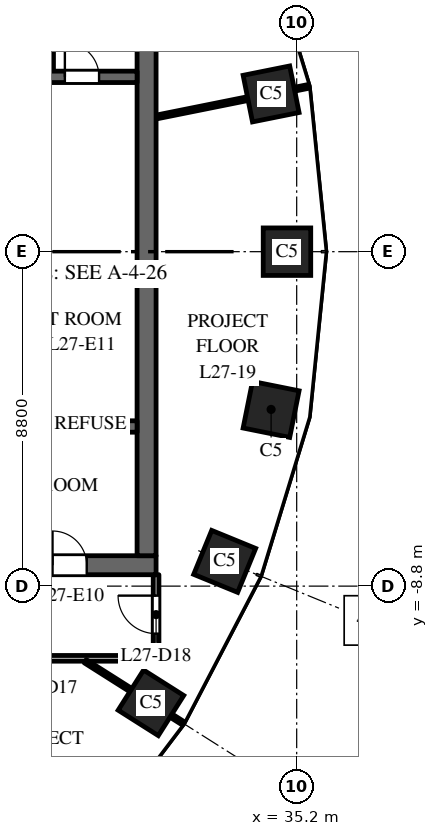
"""IFC4 building model, lengths in metres.
Left out: names, types, materials, properties, quantities, classifications, styles, units other than length and angle.
Written with IfcOpenShell. Run it as: python <this file> out.ifc"""

import sys

from ifc_helpers import new_model, si_unit, direction, frame, frame_2d, origin, origin_2d, place, context, subcontext, project, spatial, rectangle, extrude, element, fill, save


model = new_model("IFC4")
c1 = context("Model", 3, precision=1e-05, world=origin(), true_north=direction((0.0, 1.0)))
c2 = subcontext(c1, "Body", "Model", "MODEL_VIEW")
j1 = project(units=[si_unit("LENGTHUNIT", "METRE"), si_unit("PLANEANGLEUNIT", "RADIAN")], contexts=[c1])
p1 = place(None, origin())
s1 = spatial("IfcSite", under=j1, at=p1, CompositionType="ELEMENT")
p2 = place(p1, origin())
s2 = spatial("IfcBuilding", under=s1, at=p2, CompositionType="ELEMENT")
p3 = place(p2, frame((0.0, 0.0, 120.0)))
s3 = spatial("IfcBuildingStorey", under=s2, at=p3, CompositionType="ELEMENT", Elevation=120.0)
for number, where, z_axis, x_axis in (
    (1, (34.945, 0.0, 0.0), (0.0, 0.0, 1.0), (0.0, 1.0, 0.0)),
    (2, (34.527, 4.151, 0.0), (0.0, 0.0, 1.0), (-0.197, 0.98, 0.0)),
    (3, (31.365, -11.871, 0.0), (0.0, 0.0, 1.0), (0.535, 0.845, 0.0)),
    (4, (33.305, -8.149, 0.0), (0.0, 0.0, 1.0), (0.379, 0.925, 0.0)),
    (5, (34.527, -4.151, 0.0), (0.0, 0.0, 1.0), (0.197, 0.98, 0.0)),
):
    element("IfcColumn", number, at=place(p3, frame(where, z_axis=z_axis, x_axis=x_axis)), inside=s3, PredefinedType="COLUMN", context=c2, shape_type="SweptSolid", body=[
        extrude(rectangle(XDim=1.25, YDim=1.25, at=origin_2d()), origin(), (0.0, 0.0, 1.0), 4.0),
    ])
p4 = place(p3, frame((16.5, -8.25, 0.0), z_axis=(0.0, 0.0, 1.0), x_axis=(1.0, 0.0, 0.0)))
e6 = element("IfcWall", 6, at=p4, inside=s3, PredefinedType="SHEAR", context=c2, shape_type="SweptSolid", body=[
    extrude(rectangle(XDim=15.0, YDim=0.5, at=frame_2d((7.5, 0.0))), origin(), (0.0, 0.0, 1.0), 3.7),
])
p5 = place(p4, frame((6.9, 0.0, 0.0)))
e7 = element("IfcOpeningElement", 7, at=p5, cuts=e6, PredefinedType="OPENING", context=c2, shape_type="SweptSolid", body=[
    extrude(rectangle(XDim=1.2, YDim=2.1, at=frame_2d((0.6, 1.05))), frame((0.0, 0.26, 0.0), z_axis=(0.0, -1.0, 0.0), x_axis=(1.0, 0.0, 0.0)), (0.0, 0.0, 1.0), 0.52),
])
p6 = place(p4, frame((12.275, 0.0, 0.0)))
e8 = element("IfcOpeningElement", 8, at=p6, cuts=e6, PredefinedType="OPENING", context=c2, shape_type="SweptSolid", body=[
    extrude(rectangle(XDim=0.9, YDim=2.1, at=frame_2d((0.45, 1.05))), frame((0.0, 0.26, 0.0), z_axis=(0.0, -1.0, 0.0), x_axis=(1.0, 0.0, 0.0)), (0.0, 0.0, 1.0), 0.52),
])
p7 = place(p3, frame((31.25, -8.0, 0.0), z_axis=(0.0, 0.0, 1.0), x_axis=(0.0, 1.0, 0.0)))
e9 = element("IfcWall", 9, at=p7, inside=s3, PredefinedType="SHEAR", context=c2, shape_type="SweptSolid", body=[
    extrude(rectangle(XDim=16.0, YDim=0.5, at=frame_2d((8.0, 0.0))), origin(), (0.0, 0.0, 1.0), 3.7),
])
p8 = place(p3, frame((24.9, 4.6, 0.0), z_axis=(0.0, 0.0, 1.0), x_axis=(1.0, 0.0, 0.0)))
e10 = element("IfcWall", 10, at=p8, inside=s3, PredefinedType="SHEAR", context=c2, shape_type="SweptSolid", body=[
    extrude(rectangle(XDim=6.1, YDim=0.3, at=frame_2d((3.05, 0.0))), origin(), (0.0, 0.0, 1.0), 3.7),
])
p9 = place(p8, frame((4.2, 0.0, 0.0)))
e11 = element("IfcOpeningElement", 11, at=p9, cuts=e10, PredefinedType="OPENING", context=c2, shape_type="SweptSolid", body=[
    extrude(rectangle(XDim=0.9, YDim=2.1, at=frame_2d((0.45, 1.05))), frame((0.0, 0.16, 0.0), z_axis=(0.0, -1.0, 0.0), x_axis=(1.0, 0.0, 0.0)), (0.0, 0.0, 1.0), 0.32),
])
p10 = place(p3, frame((28.7, 4.75, 0.0), z_axis=(0.0, 0.0, 1.0), x_axis=(0.0, 1.0, 0.0)))
e12 = element("IfcWall", 12, at=p10, inside=s3, PredefinedType="PARTITIONING", context=c2, shape_type="SweptSolid", body=[
    extrude(rectangle(XDim=3.25, YDim=0.2, at=frame_2d((1.625, 0.0))), origin(), (0.0, 0.0, 1.0), 3.7),
])
p11 = place(p3, frame((24.9, -4.6, 0.0), z_axis=(0.0, 0.0, 1.0), x_axis=(1.0, 0.0, 0.0)))
e13 = element("IfcWall", 13, at=p11, inside=s3, PredefinedType="SHEAR", context=c2, shape_type="SweptSolid", body=[
    extrude(rectangle(XDim=6.1, YDim=0.3, at=frame_2d((3.05, 0.0))), origin(), (0.0, 0.0, 1.0), 3.7),
])
p12 = place(p3, frame((20.603, -10.7, 0.0), z_axis=(0.0, 0.0, 1.0), x_axis=(1.0, 0.0, 0.0)))
e14 = element("IfcWall", 14, at=p12, inside=s3, PredefinedType="PARTITIONING", context=c2, shape_type="SweptSolid", body=[
    extrude(rectangle(XDim=10.897, YDim=0.15, at=frame_2d((5.448, 0.0))), origin(), (0.0, 0.0, 1.0), 2.9),
])
p13 = place(p12, frame((3.792, 0.0, 0.0)))
e15 = element("IfcOpeningElement", 15, at=p13, cuts=e14, PredefinedType="OPENING", context=c2, shape_type="SweptSolid", body=[
    extrude(rectangle(XDim=1.0, YDim=2.1, at=frame_2d((0.5, 1.05))), frame((0.0, 0.085, 0.0), z_axis=(0.0, -1.0, 0.0), x_axis=(1.0, 0.0, 0.0)), (0.0, 0.0, 1.0), 0.17),
])
p14 = place(p12, frame((6.622, 0.0, 0.0)))
e16 = element("IfcOpeningElement", 16, at=p14, cuts=e14, PredefinedType="OPENING", context=c2, shape_type="SweptSolid", body=[
    extrude(rectangle(XDim=1.0, YDim=2.1, at=frame_2d((0.5, 1.05))), frame((0.0, 0.085, 0.0), z_axis=(0.0, -1.0, 0.0), x_axis=(1.0, 0.0, 0.0)), (0.0, 0.0, 1.0), 0.17),
])
p15 = place(p3, frame((29.637, -10.777, 0.0), z_axis=(0.0, 0.0, 1.0), x_axis=(0.844810627195, -0.535065420467, 0.0)))
e17 = element("IfcWall", 17, at=p15, inside=s3, PredefinedType="PARTITIONING", context=c2, shape_type="SweptSolid", body=[
    extrude(rectangle(XDim=3.048, YDim=0.1, at=frame_2d((1.524, 0.0))), origin(), (0.0, 0.0, 1.0), 2.9),
])
p16 = place(p3, frame((31.5, -10.7, 0.0), z_axis=(0.0, 0.0, 1.0), x_axis=(0.0, 1.0, 0.0)))
e18 = element("IfcWall", 18, at=p16, inside=s3, PredefinedType="PARTITIONING", context=c2, shape_type="SweptSolid", body=[
    extrude(rectangle(XDim=2.2, YDim=0.15, at=frame_2d((1.1, 0.0))), origin(), (0.0, 0.0, 1.0), 2.9),
])
p17 = place(p16, frame((0.65, 0.0, 0.0)))
e19 = element("IfcOpeningElement", 19, at=p17, cuts=e18, PredefinedType="OPENING", context=c2, shape_type="SweptSolid", body=[
    extrude(rectangle(XDim=1.0, YDim=2.1, at=frame_2d((0.5, 1.05))), frame((0.0, 0.085, 0.0), z_axis=(0.0, -1.0, 0.0), x_axis=(1.0, 0.0, 0.0)), (0.0, 0.0, 1.0), 0.17),
])
p18 = place(p3, frame((31.5, 3.542, 0.0), z_axis=(0.0, 0.0, 1.0), x_axis=(0.980357474535, 0.197228857227, 0.0)))
e20 = element("IfcWall", 20, at=p18, inside=s3, PredefinedType="PARTITIONING", context=c2, shape_type="SweptSolid", body=[
    extrude(rectangle(XDim=4.092, YDim=0.1, at=frame_2d((2.046, 0.0))), origin(), (0.0, 0.0, 1.0), 2.9),
])
p19 = place(p6, origin())
e21 = element("IfcDoor", 21, at=p19, inside=s3, OperationType="SINGLE_SWING_RIGHT", PredefinedType="DOOR", context=c2, shape_type="SweptSolid", body=[
    extrude(rectangle(XDim=0.9, YDim=2.1, at=frame_2d((0.45, 1.05))), frame((0.0, 0.025, 0.0), z_axis=(0.0, -1.0, 0.0), x_axis=(1.0, 0.0, 0.0)), (0.0, 0.0, 1.0), 0.05),
])
fill(e8, e21)
p20 = place(p9, origin())
e22 = element("IfcDoor", 22, at=p20, inside=s3, OperationType="SINGLE_SWING_RIGHT", PredefinedType="DOOR", context=c2, shape_type="SweptSolid", body=[
    extrude(rectangle(XDim=0.9, YDim=2.1, at=frame_2d((0.45, 1.05))), frame((0.0, 0.025, 0.0), z_axis=(0.0, -1.0, 0.0), x_axis=(1.0, 0.0, 0.0)), (0.0, 0.0, 1.0), 0.05),
])
fill(e11, e22)
p21 = place(p17, origin())
e23 = element("IfcDoor", 23, at=p21, inside=s3, OperationType="SINGLE_SWING_RIGHT", PredefinedType="DOOR", context=c2, shape_type="SweptSolid", body=[
    extrude(rectangle(XDim=1.0, YDim=2.1, at=frame_2d((0.5, 1.05))), frame((0.0, 0.025, 0.0), z_axis=(0.0, -1.0, 0.0), x_axis=(1.0, 0.0, 0.0)), (0.0, 0.0, 1.0), 0.05),
])
fill(e19, e23)
save(model, sys.argv[1])
